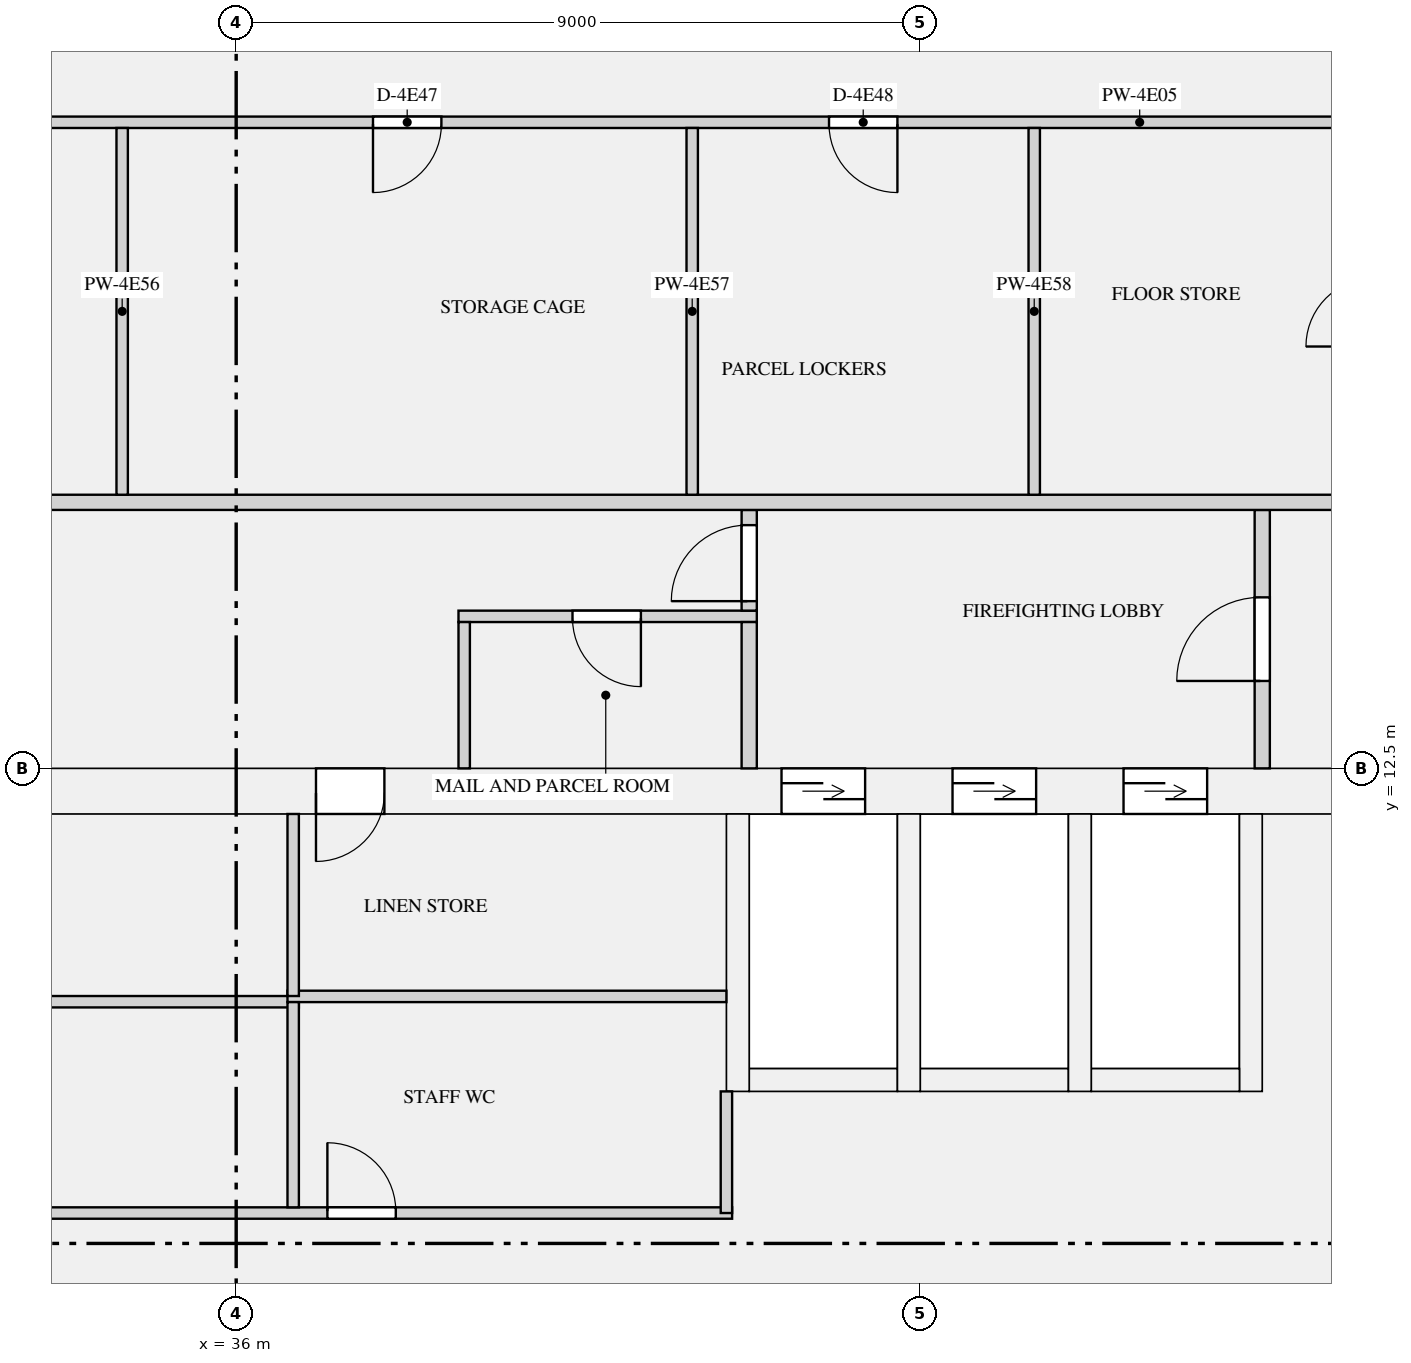
"""IFC4 building model, lengths in metres.
Left out: names, types, materials, properties, quantities, classifications, styles, units other than length and angle.
Written with IfcOpenShell. Run it as: python <this file> out.ifc"""

import sys

from ifc_helpers import new_model, si_unit, direction, frame, frame_2d, origin, place, context, subcontext, project, spatial, rectangle, extrude, element, fill, save


model = new_model("IFC4")
c1 = context("Model", 3, precision=1e-05, world=origin(), true_north=direction((0.0, 1.0)))
c2 = subcontext(c1, "Body", "Model", "MODEL_VIEW")
j1 = project(units=[si_unit("LENGTHUNIT", "METRE"), si_unit("PLANEANGLEUNIT", "RADIAN")], contexts=[c1])
p1 = place(None, origin())
s1 = spatial("IfcSite", under=j1, at=p1, CompositionType="ELEMENT")
p2 = place(p1, origin())
s2 = spatial("IfcBuilding", under=s1, at=p2, CompositionType="ELEMENT")
p3 = place(p2, frame((0.0, 0.0, 232.65)))
s3 = spatial("IfcBuildingStorey", under=s2, at=p3, CompositionType="ELEMENT", Elevation=232.65)
p4 = place(p3, frame((18.6, 12.2, 0.0), z_axis=(0.0, 0.0, 1.0), x_axis=(1.0, 0.0, 0.0)))
e1 = element("IfcWall", 1, at=p4, inside=s3, PredefinedType="SHEAR", context=c2, shape_type="SweptSolid", body=[
    extrude(rectangle(XDim=34.8, YDim=0.6, at=frame_2d((17.4, 0.0))), origin(), (0.0, 0.0, 1.0), 3.15),
])
p5 = place(p4, frame((24.575, 0.0, 0.0)))
e2 = element("IfcOpeningElement", 2, at=p5, cuts=e1, PredefinedType="OPENING", context=c2, shape_type="SweptSolid", body=[
    extrude(rectangle(XDim=1.1, YDim=2.1, at=frame_2d((0.55, 1.05))), frame((0.0, 0.31, 0.0), z_axis=(0.0, -1.0, 0.0), x_axis=(1.0, 0.0, 0.0)), (0.0, 0.0, 1.0), 0.62),
])
p6 = place(p4, frame((26.825, 0.0, 0.0)))
e3 = element("IfcOpeningElement", 3, at=p6, cuts=e1, PredefinedType="OPENING", context=c2, shape_type="SweptSolid", body=[
    extrude(rectangle(XDim=1.1, YDim=2.1, at=frame_2d((0.55, 1.05))), frame((0.0, 0.31, 0.0), z_axis=(0.0, -1.0, 0.0), x_axis=(1.0, 0.0, 0.0)), (0.0, 0.0, 1.0), 0.62),
])
p7 = place(p4, frame((29.075, 0.0, 0.0)))
e4 = element("IfcOpeningElement", 4, at=p7, cuts=e1, PredefinedType="OPENING", context=c2, shape_type="SweptSolid", body=[
    extrude(rectangle(XDim=1.1, YDim=2.1, at=frame_2d((0.55, 1.05))), frame((0.0, 0.31, 0.0), z_axis=(0.0, -1.0, 0.0), x_axis=(1.0, 0.0, 0.0)), (0.0, 0.0, 1.0), 0.62),
])
p8 = place(p4, frame((4.95, 0.0, 0.0)))
e5 = element("IfcOpeningElement", 5, at=p8, cuts=e1, PredefinedType="OPENING", context=c2, shape_type="SweptSolid", body=[
    extrude(rectangle(XDim=0.9, YDim=2.1, at=frame_2d((0.45, 1.05))), frame((0.0, 0.31, 0.0), z_axis=(0.0, -1.0, 0.0), x_axis=(1.0, 0.0, 0.0)), (0.0, 0.0, 1.0), 0.62),
])
p9 = place(p4, frame((11.95, 0.0, 0.0)))
e6 = element("IfcOpeningElement", 6, at=p9, cuts=e1, PredefinedType="OPENING", context=c2, shape_type="SweptSolid", body=[
    extrude(rectangle(XDim=0.9, YDim=2.1, at=frame_2d((0.45, 1.05))), frame((0.0, 0.31, 0.0), z_axis=(0.0, -1.0, 0.0), x_axis=(1.0, 0.0, 0.0)), (0.0, 0.0, 1.0), 0.62),
])
p10 = place(p4, frame((18.45, 0.0, 0.0)))
e7 = element("IfcOpeningElement", 7, at=p10, cuts=e1, PredefinedType="OPENING", context=c2, shape_type="SweptSolid", body=[
    extrude(rectangle(XDim=0.9, YDim=2.1, at=frame_2d((0.45, 1.05))), frame((0.0, 0.31, 0.0), z_axis=(0.0, -1.0, 0.0), x_axis=(1.0, 0.0, 0.0)), (0.0, 0.0, 1.0), 0.62),
])
p11 = place(p4, frame((1.55, 0.0, 0.0)))
e8 = element("IfcOpeningElement", 8, at=p11, cuts=e1, PredefinedType="OPENING", context=c2, shape_type="SweptSolid", body=[
    extrude(rectangle(XDim=1.2, YDim=2.1, at=frame_2d((0.6, 1.05))), frame((0.0, 0.31, 0.0), z_axis=(0.0, -1.0, 0.0), x_axis=(1.0, 0.0, 0.0)), (0.0, 0.0, 1.0), 0.62),
])
p12 = place(p4, frame((32.05, 0.0, 0.0)))
e9 = element("IfcOpeningElement", 9, at=p12, cuts=e1, PredefinedType="OPENING", context=c2, shape_type="SweptSolid", body=[
    extrude(rectangle(XDim=1.2, YDim=2.1, at=frame_2d((0.6, 1.05))), frame((0.0, 0.31, 0.0), z_axis=(0.0, -1.0, 0.0), x_axis=(1.0, 0.0, 0.0)), (0.0, 0.0, 1.0), 0.62),
])
p13 = place(p3, frame((42.75, 8.4, 0.0), z_axis=(0.0, 0.0, 1.0), x_axis=(1.0, 0.0, 0.0)))
e10 = element("IfcWall", 10, at=p13, inside=s3, PredefinedType="SHEAR", context=c2, shape_type="SweptSolid", body=[
    extrude(rectangle(XDim=1.95, YDim=0.3, at=frame_2d((0.975, 0.0))), origin(), (0.0, 0.0, 1.0), 3.15),
])
p14 = place(p3, frame((42.6, 8.25, 0.0), z_axis=(0.0, 0.0, 1.0), x_axis=(0.0, 1.0, 0.0)))
e11 = element("IfcWall", 11, at=p14, inside=s3, PredefinedType="SHEAR", context=c2, shape_type="SweptSolid", body=[
    extrude(rectangle(XDim=3.65, YDim=0.3, at=frame_2d((1.825, 0.0))), origin(), (0.0, 0.0, 1.0), 3.15),
])
p15 = place(p3, frame((45.0, 8.4, 0.0), z_axis=(0.0, 0.0, 1.0), x_axis=(1.0, 0.0, 0.0)))
e12 = element("IfcWall", 12, at=p15, inside=s3, PredefinedType="SHEAR", context=c2, shape_type="SweptSolid", body=[
    extrude(rectangle(XDim=1.95, YDim=0.3, at=frame_2d((0.975, 0.0))), origin(), (0.0, 0.0, 1.0), 3.15),
])
p16 = place(p3, frame((44.85, 8.25, 0.0), z_axis=(0.0, 0.0, 1.0), x_axis=(0.0, 1.0, 0.0)))
e13 = element("IfcWall", 13, at=p16, inside=s3, PredefinedType="SHEAR", context=c2, shape_type="SweptSolid", body=[
    extrude(rectangle(XDim=3.65, YDim=0.3, at=frame_2d((1.825, 0.0))), origin(), (0.0, 0.0, 1.0), 3.15),
])
p17 = place(p3, frame((47.25, 8.4, 0.0), z_axis=(0.0, 0.0, 1.0), x_axis=(1.0, 0.0, 0.0)))
e14 = element("IfcWall", 14, at=p17, inside=s3, PredefinedType="SHEAR", context=c2, shape_type="SweptSolid", body=[
    extrude(rectangle(XDim=1.95, YDim=0.3, at=frame_2d((0.975, 0.0))), origin(), (0.0, 0.0, 1.0), 3.15),
])
for number, where, z_axis, x_axis in (
    (15, (47.1, 8.25, 0.0), (0.0, 0.0, 1.0), (0.0, 1.0, 0.0)),
    (16, (49.35, 8.25, 0.0), (0.0, 0.0, 1.0), (0.0, 1.0, 0.0)),
):
    element("IfcWall", number, at=place(p3, frame(where, z_axis=z_axis, x_axis=x_axis)), inside=s3, PredefinedType="SHEAR", context=c2, shape_type="SweptSolid", body=[
        extrude(rectangle(XDim=3.65, YDim=0.3, at=frame_2d((1.825, 0.0))), origin(), (0.0, 0.0, 1.0), 3.15),
    ])
p18 = place(p3, frame((22.725, 6.65, 0.0), z_axis=(0.0, 0.0, 1.0), x_axis=(1.0, 0.0, 0.0)))
e17 = element("IfcWall", 17, at=p18, inside=s3, PredefinedType="PARTITIONING", context=c2, shape_type="SweptSolid", body=[
    extrude(rectangle(XDim=19.8, YDim=0.15, at=frame_2d((9.9, 0.0))), origin(), (0.0, 0.0, 1.0), 2.8),
])
p19 = place(p18, frame((0.825, 0.0, 0.0)))
e18 = element("IfcOpeningElement", 18, at=p19, cuts=e17, PredefinedType="OPENING", context=c2, shape_type="SweptSolid", body=[
    extrude(rectangle(XDim=0.9, YDim=2.1, at=frame_2d((0.45, 1.05))), frame((0.0, 0.085, 0.0), z_axis=(0.0, -1.0, 0.0), x_axis=(1.0, 0.0, 0.0)), (0.0, 0.0, 1.0), 0.17),
])
p20 = place(p18, frame((7.825, 0.0, 0.0)))
e19 = element("IfcOpeningElement", 19, at=p20, cuts=e17, PredefinedType="OPENING", context=c2, shape_type="SweptSolid", body=[
    extrude(rectangle(XDim=0.9, YDim=2.1, at=frame_2d((0.45, 1.05))), frame((0.0, 0.085, 0.0), z_axis=(0.0, -1.0, 0.0), x_axis=(1.0, 0.0, 0.0)), (0.0, 0.0, 1.0), 0.17),
])
p21 = place(p18, frame((14.475, 0.0, 0.0)))
e20 = element("IfcOpeningElement", 20, at=p21, cuts=e17, PredefinedType="OPENING", context=c2, shape_type="SweptSolid", body=[
    extrude(rectangle(XDim=0.9, YDim=2.1, at=frame_2d((0.45, 1.05))), frame((0.0, 0.085, 0.0), z_axis=(0.0, -1.0, 0.0), x_axis=(1.0, 0.0, 0.0)), (0.0, 0.0, 1.0), 0.17),
])
p22 = place(p3, frame((22.725, 9.43, 0.0), z_axis=(0.0, 0.0, 1.0), x_axis=(1.0, 0.0, 0.0)))
e21 = element("IfcWall", 21, at=p22, inside=s3, PredefinedType="PARTITIONING", context=c2, shape_type="SweptSolid", body=[
    extrude(rectangle(XDim=14.1, YDim=0.15, at=frame_2d((7.05, 0.0))), origin(), (0.0, 0.0, 1.0), 2.8),
])
p23 = place(p3, frame((36.675, 9.5, 0.0), z_axis=(0.0, 0.0, 1.0), x_axis=(1.0, 0.0, 0.0)))
e22 = element("IfcWall", 22, at=p23, inside=s3, PredefinedType="PARTITIONING", context=c2, shape_type="SweptSolid", body=[
    extrude(rectangle(XDim=5.775, YDim=0.15, at=frame_2d((2.887, 0.0))), origin(), (0.0, 0.0, 1.0), 2.8),
])
p24 = place(p3, frame((38.925, 14.5, 0.0), z_axis=(0.0, 0.0, 1.0), x_axis=(1.0, 0.0, 0.0)))
e23 = element("IfcWall", 23, at=p24, inside=s3, PredefinedType="PARTITIONING", context=c2, shape_type="SweptSolid", body=[
    extrude(rectangle(XDim=3.925, YDim=0.15, at=frame_2d((1.962, 0.0))), origin(), (0.0, 0.0, 1.0), 2.8),
])
p25 = place(p24, frame((1.5, 0.0, 0.0)))
e24 = element("IfcOpeningElement", 24, at=p25, cuts=e23, PredefinedType="OPENING", context=c2, shape_type="SweptSolid", body=[
    extrude(rectangle(XDim=0.9, YDim=2.1, at=frame_2d((0.45, 1.05))), frame((0.0, 0.085, 0.0), z_axis=(0.0, -1.0, 0.0), x_axis=(1.0, 0.0, 0.0)), (0.0, 0.0, 1.0), 0.17),
])
p26 = place(p3, frame((42.45, 6.65, 0.0), z_axis=(0.0, 0.0, 1.0), x_axis=(0.0, 1.0, 0.0)))
e25 = element("IfcWall", 25, at=p26, inside=s3, PredefinedType="PARTITIONING", context=c2, shape_type="SweptSolid", body=[
    extrude(rectangle(XDim=1.6, YDim=0.15, at=frame_2d((0.8, 0.0))), origin(), (0.0, 0.0, 1.0), 2.8),
])
p27 = place(p3, frame((36.75, 6.725, 0.0), z_axis=(0.0, 0.0, 1.0), x_axis=(0.0, 1.0, 0.0)))
e26 = element("IfcWall", 26, at=p27, inside=s3, PredefinedType="PARTITIONING", context=c2, shape_type="SweptSolid", body=[
    extrude(rectangle(XDim=2.7, YDim=0.15, at=frame_2d((1.35, 0.0))), origin(), (0.0, 0.0, 1.0), 2.8),
])
p28 = place(p3, frame((36.75, 9.505, 0.0), z_axis=(0.0, 0.0, 1.0), x_axis=(0.0, 1.0, 0.0)))
e27 = element("IfcWall", 27, at=p28, inside=s3, PredefinedType="PARTITIONING", context=c2, shape_type="SweptSolid", body=[
    extrude(rectangle(XDim=2.395, YDim=0.15, at=frame_2d((1.198, 0.0))), origin(), (0.0, 0.0, 1.0), 2.8),
])
p29 = place(p3, frame((39.0, 12.5, 0.0), z_axis=(0.0, 0.0, 1.0), x_axis=(0.0, 1.0, 0.0)))
e28 = element("IfcWall", 28, at=p29, inside=s3, PredefinedType="PARTITIONING", context=c2, shape_type="SweptSolid", body=[
    extrude(rectangle(XDim=1.925, YDim=0.15, at=frame_2d((0.962, 0.0))), origin(), (0.0, 0.0, 1.0), 2.8),
])
p30 = place(p3, frame((42.75, 12.5, 0.0), z_axis=(0.0, 0.0, 1.0), x_axis=(0.0, 1.0, 0.0)))
e29 = element("IfcWall", 29, at=p30, inside=s3, PredefinedType="PARTITIONING", context=c2, shape_type="SweptSolid", body=[
    extrude(rectangle(XDim=1.925, YDim=0.2, at=frame_2d((0.962, 0.0))), origin(), (0.0, 0.0, 1.0), 2.8),
])
p31 = place(p3, frame((49.5, 12.5, 0.0), z_axis=(0.0, 0.0, 1.0), x_axis=(0.0, 1.0, 0.0)))
e30 = element("IfcWall", 30, at=p31, inside=s3, PredefinedType="PARTITIONING", context=c2, shape_type="SweptSolid", body=[
    extrude(rectangle(XDim=3.4, YDim=0.2, at=frame_2d((1.7, 0.0))), origin(), (0.0, 0.0, 1.0), 2.8),
])
p32 = place(p31, frame((1.15, 0.0, 0.0)))
e31 = element("IfcOpeningElement", 31, at=p32, cuts=e30, PredefinedType="OPENING", context=c2, shape_type="SweptSolid", body=[
    extrude(rectangle(XDim=1.1, YDim=2.1, at=frame_2d((0.55, 1.05))), frame((0.0, 0.11, 0.0), z_axis=(0.0, -1.0, 0.0), x_axis=(1.0, 0.0, 0.0)), (0.0, 0.0, 1.0), 0.22),
])
p33 = place(p3, frame((42.75, 14.575, 0.0), z_axis=(0.0, 0.0, 1.0), x_axis=(0.0, 1.0, 0.0)))
e32 = element("IfcWall", 32, at=p33, inside=s3, PredefinedType="PARTITIONING", context=c2, shape_type="SweptSolid", body=[
    extrude(rectangle(XDim=1.325, YDim=0.2, at=frame_2d((0.663, 0.0))), origin(), (0.0, 0.0, 1.0), 2.8),
])
p34 = place(p33, frame((0.125, 0.0, 0.0)))
e33 = element("IfcOpeningElement", 33, at=p34, cuts=e32, PredefinedType="OPENING", context=c2, shape_type="SweptSolid", body=[
    extrude(rectangle(XDim=1.0, YDim=2.1, at=frame_2d((0.5, 1.05))), frame((0.0, 0.11, 0.0), z_axis=(0.0, -1.0, 0.0), x_axis=(1.0, 0.0, 0.0)), (0.0, 0.0, 1.0), 0.22),
])
p35 = place(p3, frame((20.925, 21.0, 0.0), z_axis=(0.0, 0.0, 1.0), x_axis=(1.0, 0.0, 0.0)))
e34 = element("IfcWall", 34, at=p35, inside=s3, PredefinedType="PARTITIONING", context=c2, shape_type="SweptSolid", body=[
    extrude(rectangle(XDim=30.15, YDim=0.15, at=frame_2d((15.075, 0.0))), origin(), (0.0, 0.0, 1.0), 2.8),
])
p36 = place(p35, frame((6.375, 0.0, 0.0)))
e35 = element("IfcOpeningElement", 35, at=p36, cuts=e34, PredefinedType="OPENING", context=c2, shape_type="SweptSolid", body=[
    extrude(rectangle(XDim=0.9, YDim=2.1, at=frame_2d((0.45, 1.05))), frame((0.0, 0.085, 0.0), z_axis=(0.0, -1.0, 0.0), x_axis=(1.0, 0.0, 0.0)), (0.0, 0.0, 1.0), 0.17),
])
p37 = place(p35, frame((10.875, 0.0, 0.0)))
e36 = element("IfcOpeningElement", 36, at=p37, cuts=e34, PredefinedType="OPENING", context=c2, shape_type="SweptSolid", body=[
    extrude(rectangle(XDim=0.9, YDim=2.1, at=frame_2d((0.45, 1.05))), frame((0.0, 0.085, 0.0), z_axis=(0.0, -1.0, 0.0), x_axis=(1.0, 0.0, 0.0)), (0.0, 0.0, 1.0), 0.17),
])
p38 = place(p35, frame((16.875, 0.0, 0.0)))
e37 = element("IfcOpeningElement", 37, at=p38, cuts=e34, PredefinedType="OPENING", context=c2, shape_type="SweptSolid", body=[
    extrude(rectangle(XDim=0.9, YDim=2.1, at=frame_2d((0.45, 1.05))), frame((0.0, 0.085, 0.0), z_axis=(0.0, -1.0, 0.0), x_axis=(1.0, 0.0, 0.0)), (0.0, 0.0, 1.0), 0.17),
])
p39 = place(p35, frame((22.875, 0.0, 0.0)))
e38 = element("IfcOpeningElement", 38, at=p39, cuts=e34, PredefinedType="OPENING", context=c2, shape_type="SweptSolid", body=[
    extrude(rectangle(XDim=0.9, YDim=2.1, at=frame_2d((0.45, 1.05))), frame((0.0, 0.085, 0.0), z_axis=(0.0, -1.0, 0.0), x_axis=(1.0, 0.0, 0.0)), (0.0, 0.0, 1.0), 0.17),
])
p40 = place(p3, frame((17.9, 16.0, 0.0), z_axis=(0.0, 0.0, 1.0), x_axis=(1.0, 0.0, 0.0)))
e39 = element("IfcWall", 39, at=p40, inside=s3, PredefinedType="PARTITIONING", context=c2, shape_type="SweptSolid", body=[
    extrude(rectangle(XDim=36.2, YDim=0.2, at=frame_2d((18.1, 0.0))), origin(), (0.0, 0.0, 1.0), 2.8),
])
p41 = place(p40, frame((0.9, 0.0, 0.0)))
e40 = element("IfcOpeningElement", 40, at=p41, cuts=e39, PredefinedType="OPENING", context=c2, shape_type="SweptSolid", body=[
    extrude(rectangle(XDim=1.4, YDim=2.1, at=frame_2d((0.7, 1.05))), frame((0.0, 0.11, 0.0), z_axis=(0.0, -1.0, 0.0), x_axis=(1.0, 0.0, 0.0)), (0.0, 0.0, 1.0), 0.22),
])
p42 = place(p40, frame((33.9, 0.0, 0.0)))
e41 = element("IfcOpeningElement", 41, at=p42, cuts=e39, PredefinedType="OPENING", context=c2, shape_type="SweptSolid", body=[
    extrude(rectangle(XDim=1.4, YDim=2.1, at=frame_2d((0.7, 1.05))), frame((0.0, 0.11, 0.0), z_axis=(0.0, -1.0, 0.0), x_axis=(1.0, 0.0, 0.0)), (0.0, 0.0, 1.0), 0.22),
])
for number, where, z_axis, x_axis in (
    (42, (34.5, 16.1, 0.0), (0.0, 0.0, 1.0), (0.0, 1.0, 0.0)),
    (43, (42.0, 16.1, 0.0), (0.0, 0.0, 1.0), (0.0, 1.0, 0.0)),
    (44, (46.5, 16.1, 0.0), (0.0, 0.0, 1.0), (0.0, 1.0, 0.0)),
):
    element("IfcWall", number, at=place(p3, frame(where, z_axis=z_axis, x_axis=x_axis)), inside=s3, PredefinedType="PARTITIONING", context=c2, shape_type="SweptSolid", body=[
        extrude(rectangle(XDim=4.825, YDim=0.15, at=frame_2d((2.413, 0.0))), origin(), (0.0, 0.0, 1.0), 2.8),
    ])
p43 = place(p5, origin())
e45 = element("IfcDoor", 45, at=p43, inside=s3, OperationType="DOUBLE_DOOR_SLIDING", PredefinedType="DOOR", context=c2, shape_type="SweptSolid", body=[
    extrude(rectangle(XDim=1.1, YDim=2.1, at=frame_2d((0.55, 1.05))), frame((0.0, 0.025, 0.0), z_axis=(0.0, -1.0, 0.0), x_axis=(1.0, 0.0, 0.0)), (0.0, 0.0, 1.0), 0.05),
])
fill(e2, e45)
p44 = place(p6, origin())
e46 = element("IfcDoor", 46, at=p44, inside=s3, OperationType="DOUBLE_DOOR_SLIDING", PredefinedType="DOOR", context=c2, shape_type="SweptSolid", body=[
    extrude(rectangle(XDim=1.1, YDim=2.1, at=frame_2d((0.55, 1.05))), frame((0.0, 0.025, 0.0), z_axis=(0.0, -1.0, 0.0), x_axis=(1.0, 0.0, 0.0)), (0.0, 0.0, 1.0), 0.05),
])
fill(e3, e46)
p45 = place(p7, origin())
e47 = element("IfcDoor", 47, at=p45, inside=s3, OperationType="DOUBLE_DOOR_SLIDING", PredefinedType="DOOR", context=c2, shape_type="SweptSolid", body=[
    extrude(rectangle(XDim=1.1, YDim=2.1, at=frame_2d((0.55, 1.05))), frame((0.0, 0.025, 0.0), z_axis=(0.0, -1.0, 0.0), x_axis=(1.0, 0.0, 0.0)), (0.0, 0.0, 1.0), 0.05),
])
fill(e4, e47)
p46 = place(p25, frame((0.9, 0.0, 0.0), z_axis=(0.0, 0.0, 1.0), x_axis=(-1.0, 0.0, 0.0)))
e48 = element("IfcDoor", 48, at=p46, inside=s3, OperationType="SINGLE_SWING_LEFT", PredefinedType="DOOR", context=c2, shape_type="SweptSolid", body=[
    extrude(rectangle(XDim=0.9, YDim=2.1, at=frame_2d((0.45, 1.05))), frame((0.0, 0.025, 0.0), z_axis=(0.0, -1.0, 0.0), x_axis=(1.0, 0.0, 0.0)), (0.0, 0.0, 1.0), 0.05),
])
fill(e24, e48)
p47 = place(p21, origin())
e49 = element("IfcDoor", 49, at=p47, inside=s3, OperationType="SINGLE_SWING_LEFT", PredefinedType="DOOR", context=c2, shape_type="SweptSolid", body=[
    extrude(rectangle(XDim=0.9, YDim=2.1, at=frame_2d((0.45, 1.05))), frame((0.0, 0.025, 0.0), z_axis=(0.0, -1.0, 0.0), x_axis=(1.0, 0.0, 0.0)), (0.0, 0.0, 1.0), 0.05),
])
fill(e20, e49)
p48 = place(p10, frame((0.9, 0.0, 0.0), z_axis=(0.0, 0.0, 1.0), x_axis=(-1.0, 0.0, 0.0)))
e50 = element("IfcDoor", 50, at=p48, inside=s3, OperationType="SINGLE_SWING_RIGHT", PredefinedType="DOOR", context=c2, shape_type="SweptSolid", body=[
    extrude(rectangle(XDim=0.9, YDim=2.1, at=frame_2d((0.45, 1.05))), frame((0.0, 0.025, 0.0), z_axis=(0.0, -1.0, 0.0), x_axis=(1.0, 0.0, 0.0)), (0.0, 0.0, 1.0), 0.05),
])
fill(e7, e50)
p49 = place(p34, origin())
e51 = element("IfcDoor", 51, at=p49, inside=s3, OperationType="SINGLE_SWING_LEFT", PredefinedType="DOOR", context=c2, shape_type="SweptSolid", body=[
    extrude(rectangle(XDim=1.0, YDim=2.1, at=frame_2d((0.5, 1.05))), frame((0.0, 0.025, 0.0), z_axis=(0.0, -1.0, 0.0), x_axis=(1.0, 0.0, 0.0)), (0.0, 0.0, 1.0), 0.05),
])
fill(e33, e51)
p50 = place(p32, origin())
e52 = element("IfcDoor", 52, at=p50, inside=s3, OperationType="SINGLE_SWING_LEFT", PredefinedType="DOOR", context=c2, shape_type="SweptSolid", body=[
    extrude(rectangle(XDim=1.1, YDim=2.1, at=frame_2d((0.55, 1.05))), frame((0.0, 0.025, 0.0), z_axis=(0.0, -1.0, 0.0), x_axis=(1.0, 0.0, 0.0)), (0.0, 0.0, 1.0), 0.05),
])
fill(e31, e52)
p51 = place(p38, frame((0.9, 0.0, 0.0), z_axis=(0.0, 0.0, 1.0), x_axis=(-1.0, 0.0, 0.0)))
e53 = element("IfcDoor", 53, at=p51, inside=s3, OperationType="SINGLE_SWING_RIGHT", PredefinedType="DOOR", context=c2, shape_type="SweptSolid", body=[
    extrude(rectangle(XDim=0.9, YDim=2.1, at=frame_2d((0.45, 1.05))), frame((0.0, 0.025, 0.0), z_axis=(0.0, -1.0, 0.0), x_axis=(1.0, 0.0, 0.0)), (0.0, 0.0, 1.0), 0.05),
])
fill(e37, e53)
p52 = place(p39, frame((0.9, 0.0, 0.0), z_axis=(0.0, 0.0, 1.0), x_axis=(-1.0, 0.0, 0.0)))
e54 = element("IfcDoor", 54, at=p52, inside=s3, OperationType="SINGLE_SWING_LEFT", PredefinedType="DOOR", context=c2, shape_type="SweptSolid", body=[
    extrude(rectangle(XDim=0.9, YDim=2.1, at=frame_2d((0.45, 1.05))), frame((0.0, 0.025, 0.0), z_axis=(0.0, -1.0, 0.0), x_axis=(1.0, 0.0, 0.0)), (0.0, 0.0, 1.0), 0.05),
])
fill(e38, e54)
save(model, sys.argv[1])
